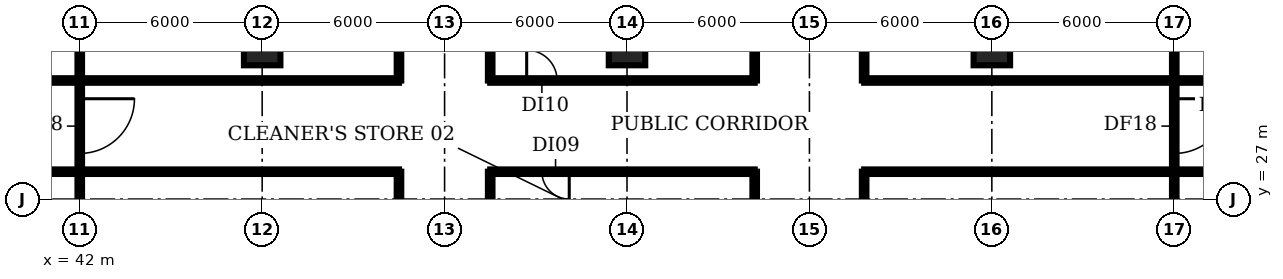
"""IFC4 building model, lengths in metres.
Left out: names, types, materials, properties, quantities, classifications, styles, units other than length and angle.
Written with IfcOpenShell. Run it as: python <this file> out.ifc"""

import sys

from ifc_helpers import new_model, si_unit, direction, frame, frame_2d, origin, origin_2d, place, context, subcontext, project, spatial, rectangle, extrude, element, fill, save


model = new_model("IFC4")
c1 = context("Model", 3, precision=1e-05, world=origin(), true_north=direction((0.0, 1.0)))
c2 = subcontext(c1, "Body", "Model", "MODEL_VIEW")
j1 = project(units=[si_unit("LENGTHUNIT", "METRE"), si_unit("PLANEANGLEUNIT", "RADIAN")], contexts=[c1])
p1 = place(None, origin())
s1 = spatial("IfcSite", under=j1, at=p1, CompositionType="ELEMENT")
p2 = place(p1, origin())
s2 = spatial("IfcBuilding", under=s1, at=p2, CompositionType="ELEMENT")
p3 = place(p2, origin())
s3 = spatial("IfcBuildingStorey", under=s2, at=p3, CompositionType="ELEMENT", Elevation=0.0)
for number, where, z_axis, x_axis in (
    (1, (48.0, 32.0, 0.0), (0.0, 0.0, 1.0), (1.0, 0.0, 0.0)),
    (2, (60.0, 32.0, 0.0), (0.0, 0.0, 1.0), (1.0, 0.0, 0.0)),
    (3, (72.0, 32.0, 0.0), (0.0, 0.0, 1.0), (1.0, 0.0, 0.0)),
):
    element("IfcColumn", number, at=place(p3, frame(where, z_axis=z_axis, x_axis=x_axis)), inside=s3, PredefinedType="COLUMN", context=c2, shape_type="SweptSolid", body=[
        extrude(rectangle(XDim=1.2, YDim=1.2, at=origin_2d()), origin(), (0.0, 0.0, 1.0), 5.65),
    ])
for number, where, z_axis, x_axis in (
    (4, (31.5, 27.9, 0.0), (0.0, 0.0, 1.0), (1.0, 0.0, 0.0)),
    (5, (31.5, 30.9, 0.0), (0.0, 0.0, 1.0), (1.0, 0.0, 0.0)),
):
    element("IfcWall", number, at=place(p3, frame(where, z_axis=z_axis, x_axis=x_axis)), inside=s3, PredefinedType="PARTITIONING", context=c2, shape_type="SweptSolid", body=[
        extrude(rectangle(XDim=21.0, YDim=0.15, at=frame_2d((10.5, 0.0))), origin(), (0.0, 0.0, 1.0), 4.53),
    ])
p4 = place(p3, frame((42.0, -4.5, 0.0), z_axis=(0.0, 0.0, 1.0), x_axis=(0.0, 1.0, 0.0)))
e6 = element("IfcWall", 6, at=p4, inside=s3, PredefinedType="PARTITIONING", context=c2, shape_type="SweptSolid", body=[
    extrude(rectangle(XDim=32.4, YDim=0.15, at=frame_2d((16.2, 0.0))), origin(), (0.0, 0.0, 1.0), 4.53),
])
p5 = place(p3, frame((42.0, 30.9, 0.0), z_axis=(0.0, 0.0, 1.0), x_axis=(0.0, -1.0, 0.0)))
e7 = element("IfcWall", 7, at=p5, inside=s3, PredefinedType="PARTITIONING", context=c2, shape_type="SweptSolid", body=[
    extrude(rectangle(XDim=3.0, YDim=0.15, at=frame_2d((1.5, 0.0))), origin(), (0.0, 0.0, 1.0), 4.53),
])
p6 = place(p5, frame((0.6, 0.0, 0.0)))
e8 = element("IfcOpeningElement", 8, at=p6, cuts=e7, PredefinedType="OPENING", context=c2, shape_type="SweptSolid", body=[
    extrude(rectangle(XDim=1.8, YDim=2.1, at=frame_2d((0.9, 1.05))), frame((0.0, 0.085, 0.0), z_axis=(0.0, -1.0, 0.0), x_axis=(1.0, 0.0, 0.0)), (0.0, 0.0, 1.0), 0.17),
])
p7 = place(p3, frame((42.0, 30.9, 0.0), z_axis=(0.0, 0.0, 1.0), x_axis=(0.0, 1.0, 0.0)))
e9 = element("IfcWall", 9, at=p7, inside=s3, PredefinedType="PARTITIONING", context=c2, shape_type="SweptSolid", body=[
    extrude(rectangle(XDim=31.58, YDim=0.15, at=frame_2d((15.79, 0.0))), origin(), (0.0, 0.0, 1.0), 4.53),
])
p8 = place(p3, frame((52.5, 27.9, 0.0), z_axis=(0.0, 0.0, 1.0), x_axis=(0.0, -1.0, 0.0)))
e10 = element("IfcWall", 10, at=p8, inside=s3, PredefinedType="PARTITIONING", context=c2, shape_type="SweptSolid", body=[
    extrude(rectangle(XDim=31.82, YDim=0.15, at=frame_2d((15.91, 0.0))), origin(), (0.0, 0.0, 1.0), 4.53),
])
p9 = place(p8, frame((14.9, 0.0, 0.0)))
e11 = element("IfcOpeningElement", 11, at=p9, cuts=e10, PredefinedType="OPENING", context=c2, shape_type="SweptSolid", body=[
    extrude(rectangle(XDim=1.8, YDim=2.1, at=frame_2d((0.9, 1.05))), frame((0.0, 0.085, 0.0), z_axis=(0.0, -1.0, 0.0), x_axis=(1.0, 0.0, 0.0)), (0.0, 0.0, 1.0), 0.17),
])
p10 = place(p3, frame((52.5, 42.83, 0.0), z_axis=(0.0, 0.0, 1.0), x_axis=(0.0, -1.0, 0.0)))
e12 = element("IfcWall", 12, at=p10, inside=s3, PredefinedType="PARTITIONING", context=c2, shape_type="SweptSolid", body=[
    extrude(rectangle(XDim=11.93, YDim=0.15, at=frame_2d((5.965, 0.0))), origin(), (0.0, 0.0, 1.0), 4.53),
])
p11 = place(p10, frame((5.0, 0.0, 0.0)))
e13 = element("IfcOpeningElement", 13, at=p11, cuts=e12, PredefinedType="OPENING", context=c2, shape_type="SweptSolid", body=[
    extrude(rectangle(XDim=1.8, YDim=2.1, at=frame_2d((0.9, 1.05))), frame((0.0, 0.085, 0.0), z_axis=(0.0, -1.0, 0.0), x_axis=(1.0, 0.0, 0.0)), (0.0, 0.0, 1.0), 0.17),
])
p12 = place(p3, frame((55.5, 21.54, 0.0), z_axis=(0.0, 0.0, 1.0), x_axis=(0.0, 1.0, 0.0)))
e14 = element("IfcWall", 14, at=p12, inside=s3, PredefinedType="PARTITIONING", context=c2, shape_type="SweptSolid", body=[
    extrude(rectangle(XDim=6.36, YDim=0.15, at=frame_2d((3.18, 0.0))), origin(), (0.0, 0.0, 1.0), 4.53),
])
p13 = place(p3, frame((55.5, 30.9, 0.0), z_axis=(0.0, 0.0, 1.0), x_axis=(0.0, 1.0, 0.0)))
e15 = element("IfcWall", 15, at=p13, inside=s3, PredefinedType="PARTITIONING", context=c2, shape_type="SweptSolid", body=[
    extrude(rectangle(XDim=35.8, YDim=0.15, at=frame_2d((17.9, 0.0))), origin(), (0.0, 0.0, 1.0), 4.53),
])
p14 = place(p3, frame((55.5, 30.9, 0.0), z_axis=(0.0, 0.0, 1.0), x_axis=(1.0, 0.0, 0.0)))
e16 = element("IfcWall", 16, at=p14, inside=s3, PredefinedType="PARTITIONING", context=c2, shape_type="SweptSolid", body=[
    extrude(rectangle(XDim=8.7, YDim=0.15, at=frame_2d((4.35, 0.0))), origin(), (0.0, 0.0, 1.0), 4.53),
])
p15 = place(p14, frame((1.2, 0.0, 0.0)))
e17 = element("IfcOpeningElement", 17, at=p15, cuts=e16, PredefinedType="OPENING", context=c2, shape_type="SweptSolid", body=[
    extrude(rectangle(XDim=1.0, YDim=2.1, at=frame_2d((0.5, 1.05))), frame((0.0, 0.085, 0.0), z_axis=(0.0, -1.0, 0.0), x_axis=(1.0, 0.0, 0.0)), (0.0, 0.0, 1.0), 0.17),
])
p16 = place(p3, frame((64.2, 24.16, 0.0), z_axis=(0.0, 0.0, 1.0), x_axis=(0.0, 1.0, 0.0)))
e18 = element("IfcWall", 18, at=p16, inside=s3, PredefinedType="PARTITIONING", context=c2, shape_type="SweptSolid", body=[
    extrude(rectangle(XDim=3.74, YDim=0.15, at=frame_2d((1.87, 0.0))), origin(), (0.0, 0.0, 1.0), 4.53),
])
p17 = place(p3, frame((64.2, 27.9, 0.0), z_axis=(0.0, 0.0, 1.0), x_axis=(-1.0, 0.0, 0.0)))
e19 = element("IfcWall", 19, at=p17, inside=s3, PredefinedType="PARTITIONING", context=c2, shape_type="SweptSolid", body=[
    extrude(rectangle(XDim=8.7, YDim=0.15, at=frame_2d((4.35, 0.0))), origin(), (0.0, 0.0, 1.0), 4.53),
])
p18 = place(p17, frame((6.1, 0.0, 0.0)))
e20 = element("IfcOpeningElement", 20, at=p18, cuts=e19, PredefinedType="OPENING", context=c2, shape_type="SweptSolid", body=[
    extrude(rectangle(XDim=0.9, YDim=2.1, at=frame_2d((0.45, 1.05))), frame((0.0, 0.085, 0.0), z_axis=(0.0, -1.0, 0.0), x_axis=(1.0, 0.0, 0.0)), (0.0, 0.0, 1.0), 0.17),
])
p19 = place(p3, frame((64.2, 30.9, 0.0), z_axis=(0.0, 0.0, 1.0), x_axis=(0.0, 1.0, 0.0)))
e21 = element("IfcWall", 21, at=p19, inside=s3, PredefinedType="PARTITIONING", context=c2, shape_type="SweptSolid", body=[
    extrude(rectangle(XDim=3.98, YDim=0.15, at=frame_2d((1.99, 0.0))), origin(), (0.0, 0.0, 1.0), 4.53),
])
p20 = place(p3, frame((67.8, 27.9, 0.0), z_axis=(0.0, 0.0, 1.0), x_axis=(0.0, -1.0, 0.0)))
e22 = element("IfcWall", 22, at=p20, inside=s3, PredefinedType="PARTITIONING", context=c2, shape_type="SweptSolid", body=[
    extrude(rectangle(XDim=11.61, YDim=0.15, at=frame_2d((5.805, 0.0))), origin(), (0.0, 0.0, 1.0), 4.53),
])
p21 = place(p20, frame((5.11, 0.0, 0.0)))
e23 = element("IfcOpeningElement", 23, at=p21, cuts=e22, PredefinedType="OPENING", context=c2, shape_type="SweptSolid", body=[
    extrude(rectangle(XDim=1.2, YDim=2.1, at=frame_2d((0.6, 1.05))), frame((0.0, 0.085, 0.0), z_axis=(0.0, -1.0, 0.0), x_axis=(1.0, 0.0, 0.0)), (0.0, 0.0, 1.0), 0.17),
])
p22 = place(p3, frame((67.8, 27.9, 0.0), z_axis=(0.0, 0.0, 1.0), x_axis=(1.0, 0.0, 0.0)))
e24 = element("IfcWall", 24, at=p22, inside=s3, PredefinedType="PARTITIONING", context=c2, shape_type="SweptSolid", body=[
    extrude(rectangle(XDim=10.2, YDim=0.15, at=frame_2d((5.1, 0.0))), origin(), (0.0, 0.0, 1.0), 4.53),
])
p23 = place(p3, frame((67.8, 30.9, 0.0), z_axis=(0.0, 0.0, 1.0), x_axis=(0.0, 1.0, 0.0)))
e25 = element("IfcWall", 25, at=p23, inside=s3, PredefinedType="PARTITIONING", context=c2, shape_type="SweptSolid", body=[
    extrude(rectangle(XDim=23.87, YDim=0.15, at=frame_2d((11.935, 0.0))), origin(), (0.0, 0.0, 1.0), 4.53),
])
p24 = place(p23, frame((11.0, 0.0, 0.0)))
e26 = element("IfcOpeningElement", 26, at=p24, cuts=e25, PredefinedType="OPENING", context=c2, shape_type="SweptSolid", body=[
    extrude(rectangle(XDim=1.8, YDim=2.1, at=frame_2d((0.9, 1.05))), frame((0.0, 0.085, 0.0), z_axis=(0.0, -1.0, 0.0), x_axis=(1.0, 0.0, 0.0)), (0.0, 0.0, 1.0), 0.17),
])
p25 = place(p3, frame((67.8, 30.9, 0.0), z_axis=(0.0, 0.0, 1.0), x_axis=(1.0, 0.0, 0.0)))
e27 = element("IfcWall", 27, at=p25, inside=s3, PredefinedType="PARTITIONING", context=c2, shape_type="SweptSolid", body=[
    extrude(rectangle(XDim=10.2, YDim=0.15, at=frame_2d((5.1, 0.0))), origin(), (0.0, 0.0, 1.0), 4.53),
])
p26 = place(p3, frame((78.0, -3.92, 0.0), z_axis=(0.0, 0.0, 1.0), x_axis=(0.0, 1.0, 0.0)))
e28 = element("IfcWall", 28, at=p26, inside=s3, PredefinedType="PARTITIONING", context=c2, shape_type="SweptSolid", body=[
    extrude(rectangle(XDim=31.82, YDim=0.15, at=frame_2d((15.91, 0.0))), origin(), (0.0, 0.0, 1.0), 4.53),
])
p27 = place(p3, frame((78.0, 30.9, 0.0), z_axis=(0.0, 0.0, 1.0), x_axis=(0.0, -1.0, 0.0)))
e29 = element("IfcWall", 29, at=p27, inside=s3, PredefinedType="PARTITIONING", context=c2, shape_type="SweptSolid", body=[
    extrude(rectangle(XDim=3.0, YDim=0.15, at=frame_2d((1.5, 0.0))), origin(), (0.0, 0.0, 1.0), 4.53),
])
p28 = place(p27, frame((0.6, 0.0, 0.0)))
e30 = element("IfcOpeningElement", 30, at=p28, cuts=e29, PredefinedType="OPENING", context=c2, shape_type="SweptSolid", body=[
    extrude(rectangle(XDim=1.8, YDim=2.1, at=frame_2d((0.9, 1.05))), frame((0.0, 0.085, 0.0), z_axis=(0.0, -1.0, 0.0), x_axis=(1.0, 0.0, 0.0)), (0.0, 0.0, 1.0), 0.17),
])
p29 = place(p3, frame((78.0, 30.9, 0.0), z_axis=(0.0, 0.0, 1.0), x_axis=(0.0, 1.0, 0.0)))
e31 = element("IfcWall", 31, at=p29, inside=s3, PredefinedType="PARTITIONING", context=c2, shape_type="SweptSolid", body=[
    extrude(rectangle(XDim=35.8, YDim=0.15, at=frame_2d((17.9, 0.0))), origin(), (0.0, 0.0, 1.0), 4.53),
])
p30 = place(p3, frame((78.0, 30.9, 0.0), z_axis=(0.0, 0.0, 1.0), x_axis=(1.0, 0.0, 0.0)))
e32 = element("IfcWall", 32, at=p30, inside=s3, PredefinedType="PARTITIONING", context=c2, shape_type="SweptSolid", body=[
    extrude(rectangle(XDim=15.7, YDim=0.15, at=frame_2d((7.85, 0.0))), origin(), (0.0, 0.0, 1.0), 4.53),
])
p31 = place(p30, frame((8.3, 0.0, 0.0)))
e33 = element("IfcOpeningElement", 33, at=p31, cuts=e32, PredefinedType="OPENING", context=c2, shape_type="SweptSolid", body=[
    extrude(rectangle(XDim=1.2, YDim=2.1, at=frame_2d((0.6, 1.05))), frame((0.0, 0.085, 0.0), z_axis=(0.0, -1.0, 0.0), x_axis=(1.0, 0.0, 0.0)), (0.0, 0.0, 1.0), 0.17),
])
p32 = place(p3, frame((93.7, 27.9, 0.0), z_axis=(0.0, 0.0, 1.0), x_axis=(-1.0, 0.0, 0.0)))
e34 = element("IfcWall", 34, at=p32, inside=s3, PredefinedType="PARTITIONING", context=c2, shape_type="SweptSolid", body=[
    extrude(rectangle(XDim=15.7, YDim=0.15, at=frame_2d((7.85, 0.0))), origin(), (0.0, 0.0, 1.0), 4.53),
])
p33 = place(p32, frame((6.5, 0.0, 0.0)))
e35 = element("IfcOpeningElement", 35, at=p33, cuts=e34, PredefinedType="OPENING", context=c2, shape_type="SweptSolid", body=[
    extrude(rectangle(XDim=1.2, YDim=2.1, at=frame_2d((0.6, 1.05))), frame((0.0, 0.085, 0.0), z_axis=(0.0, -1.0, 0.0), x_axis=(1.0, 0.0, 0.0)), (0.0, 0.0, 1.0), 0.17),
])
p34 = place(p6, origin())
e36 = element("IfcDoor", 36, at=p34, inside=s3, OperationType="SINGLE_SWING_LEFT", PredefinedType="DOOR", context=c2, shape_type="SweptSolid", body=[
    extrude(rectangle(XDim=1.8, YDim=2.1, at=frame_2d((0.9, 1.05))), frame((0.0, 0.025, 0.0), z_axis=(0.0, -1.0, 0.0), x_axis=(1.0, 0.0, 0.0)), (0.0, 0.0, 1.0), 0.05),
])
fill(e8, e36)
p35 = place(p15, origin())
e37 = element("IfcDoor", 37, at=p35, inside=s3, OperationType="SINGLE_SWING_LEFT", PredefinedType="DOOR", context=c2, shape_type="SweptSolid", body=[
    extrude(rectangle(XDim=1.0, YDim=2.1, at=frame_2d((0.5, 1.05))), frame((0.0, 0.025, 0.0), z_axis=(0.0, -1.0, 0.0), x_axis=(1.0, 0.0, 0.0)), (0.0, 0.0, 1.0), 0.05),
])
fill(e17, e37)
p36 = place(p18, origin())
e38 = element("IfcDoor", 38, at=p36, inside=s3, OperationType="SINGLE_SWING_LEFT", PredefinedType="DOOR", context=c2, shape_type="SweptSolid", body=[
    extrude(rectangle(XDim=0.9, YDim=2.1, at=frame_2d((0.45, 1.05))), frame((0.0, 0.025, 0.0), z_axis=(0.0, -1.0, 0.0), x_axis=(1.0, 0.0, 0.0)), (0.0, 0.0, 1.0), 0.05),
])
fill(e20, e38)
p37 = place(p28, origin())
e39 = element("IfcDoor", 39, at=p37, inside=s3, OperationType="SINGLE_SWING_LEFT", PredefinedType="DOOR", context=c2, shape_type="SweptSolid", body=[
    extrude(rectangle(XDim=1.8, YDim=2.1, at=frame_2d((0.9, 1.05))), frame((0.0, 0.025, 0.0), z_axis=(0.0, -1.0, 0.0), x_axis=(1.0, 0.0, 0.0)), (0.0, 0.0, 1.0), 0.05),
])
fill(e30, e39)
save(model, sys.argv[1])
